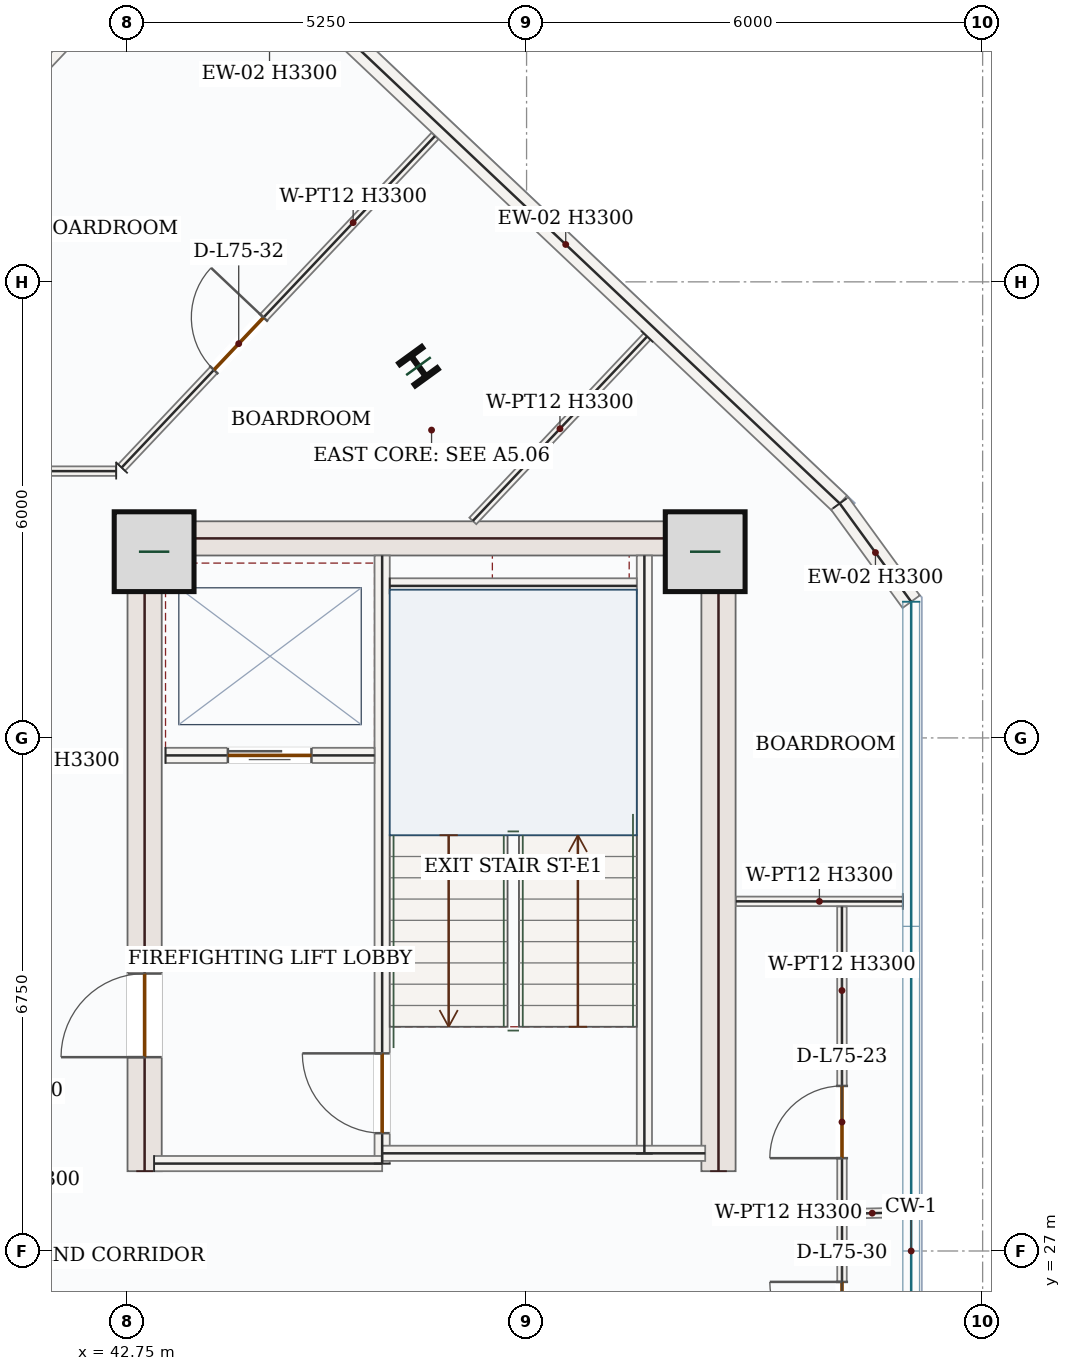
"""IFC4 building model, lengths in metres.
Left out: names, types, materials, properties, quantities, classifications, styles, units other than length and angle.
Written with IfcOpenShell. Run it as: python <this file> out.ifc"""

import sys

from ifc_helpers import new_model, si_unit, direction, frame, frame_2d, origin, origin_2d, place, context, subcontext, project, spatial, rectangle, i_section, extrude, source, transform, mapped, element, fill, save


model = new_model("IFC4")
c1 = context("Model", 3, precision=1e-05, world=origin(), true_north=direction((0.0, 1.0)))
c2 = subcontext(c1, "Body", "Model", "MODEL_VIEW")
j1 = project(units=[si_unit("LENGTHUNIT", "METRE"), si_unit("PLANEANGLEUNIT", "RADIAN")], contexts=[c1])
p1 = place(None, origin())
s1 = spatial("IfcSite", under=j1, at=p1, CompositionType="ELEMENT")
p2 = place(p1, origin())
s2 = spatial("IfcBuilding", under=s1, at=p2, CompositionType="ELEMENT")
p3 = place(p2, frame((0.0, 0.0, 310.35)))
s3 = spatial("IfcBuildingStorey", under=s2, at=p3, CompositionType="ELEMENT", Elevation=310.35)
p4 = place(p3, frame((42.975, 28.05, 0.0), z_axis=(0.0, 0.0, 1.0), x_axis=(0.0, 1.0, 0.0)))
e1 = element("IfcWall", 1, at=p4, inside=s3, PredefinedType="SHEAR", context=c2, shape_type="SweptSolid", body=[
    extrude(rectangle(XDim=8.55, YDim=0.45, at=frame_2d((4.275, 0.0))), origin(), (0.0, 0.0, 1.0), 3.3),
])
p5 = place(p4, frame((1.5, 0.0, 0.0)))
e2 = element("IfcOpeningElement", 2, at=p5, cuts=e1, PredefinedType="OPENING", context=c2, shape_type="SweptSolid", body=[
    extrude(rectangle(XDim=1.1, YDim=2.2, at=frame_2d((0.55, 1.1))), frame((0.0, 0.235, 0.0), z_axis=(0.0, -1.0, 0.0), x_axis=(1.0, 0.0, 0.0)), (0.0, 0.0, 1.0), 0.47),
])
m1 = source(origin(), c2, "Body", "SweptSolid", [
    extrude(rectangle(XDim=8.55, YDim=0.45, at=frame_2d((4.275, 0.0))), origin(), (0.0, 0.0, 1.0), 3.3),
])
p6 = place(p3, frame((50.525, 28.05, 0.0), z_axis=(0.0, 0.0, 1.0), x_axis=(0.0, 1.0, 0.0)))
e3 = element("IfcWall", 3, at=p6, inside=s3, PredefinedType="SHEAR", context=c2, shape_type="MappedRepresentation", body=[
    mapped(m1, transform((0.0, 0.0, 0.0), x_axis=(1.0, 0.0, 0.0), y_axis=(0.0, 1.0, 0.0), z_axis=(0.0, 0.0, 1.0), scale=1.0)),
])
m2 = source(origin(), c2, "Body", "SweptSolid", [
    extrude(rectangle(XDim=7.1, YDim=0.45, at=frame_2d((3.55, 0.0))), origin(), (0.0, 0.0, 1.0), 3.3),
])
p7 = place(p3, frame((43.2, 36.375, 0.0), z_axis=(0.0, 0.0, 1.0), x_axis=(1.0, 0.0, 0.0)))
e4 = element("IfcWall", 4, at=p7, inside=s3, PredefinedType="SHEAR", context=c2, shape_type="MappedRepresentation", body=[
    mapped(m2, transform((0.0, 0.0, 0.0), x_axis=(1.0, 0.0, 0.0), y_axis=(0.0, 1.0, 0.0), z_axis=(0.0, 0.0, 1.0), scale=1.0)),
])
m3 = source(origin(), c2, "Body", "SweptSolid", [
    extrude(rectangle(XDim=1.05, YDim=1.05, at=origin_2d()), origin(), (0.0, 0.0, 1.0), 3.75),
])
for number, where, z_axis, x_axis in (
    (5, (43.1, 36.2, 0.0), (0.0, 0.0, 1.0), (1.0, 0.0, 0.0)),
    (6, (50.35, 36.2, 0.0), (0.0, 0.0, 1.0), (1.0, 0.0, 0.0)),
):
    element("IfcColumn", number, at=place(p3, frame(where, z_axis=z_axis, x_axis=x_axis)), inside=s3, PredefinedType="COLUMN", context=c2, shape_type="MappedRepresentation", body=[
        mapped(m3, transform((0.0, 0.0, 0.0), x_axis=(1.0, 0.0, 0.0), y_axis=(0.0, 1.0, 0.0), z_axis=(0.0, 0.0, 1.0), scale=1.0)),
    ])
m4 = source(origin(), c2, "Body", "SweptSolid", [
    extrude(i_section(OverallWidth=0.374, OverallDepth=0.372, WebThickness=0.016, FlangeThickness=0.026, FilletRadius=0.018, at=origin_2d()), origin(), (0.0, 0.0, 1.0), 3.75),
])
p8 = place(p3, frame((46.578, 38.641, 0.0), z_axis=(0.0, 0.0, 1.0), x_axis=(0.809016994375, 0.587785252292, 0.0)))
e7 = element("IfcColumn", 7, at=p8, inside=s3, PredefinedType="COLUMN", context=c2, shape_type="MappedRepresentation", body=[
    mapped(m4, transform((0.0, 0.0, 0.0), x_axis=(1.0, 0.0, 0.0), y_axis=(0.0, 1.0, 0.0), z_axis=(0.0, 0.0, 1.0), scale=1.0)),
])
p9 = place(p3, frame((38.423, 39.26, 0.0), z_axis=(0.0, 0.0, 1.0), x_axis=(0.686888766374, 0.72676256276, 0.0)))
e8 = element("IfcWall", 8, at=p9, inside=s3, PredefinedType="SOLIDWALL", context=c2, shape_type="SweptSolid", body=[
    extrude(rectangle(XDim=5.945, YDim=0.28, at=frame_2d((2.973, 0.0))), origin(), (0.0, 0.0, 1.0), 3.3),
])
p10 = place(p9, frame((2.448, 0.0, 0.0)))
e9 = element("IfcOpeningElement", 9, at=p10, cuts=e8, PredefinedType="OPENING", context=c2, shape_type="SweptSolid", body=[
    extrude(rectangle(XDim=1.05, YDim=2.15, at=frame_2d((0.525, 1.075))), frame((0.0, 0.15, 0.0), z_axis=(0.0, -1.0, 0.0), x_axis=(1.0, 0.0, 0.0)), (0.0, 0.0, 1.0), 0.3),
])
m5 = source(origin(), c2, "Body", "SweptSolid", [
    extrude(rectangle(XDim=9.92, YDim=0.28, at=frame_2d((4.96, 0.0))), origin(), (0.0, 0.0, 1.0), 3.3),
])
p11 = place(p3, frame((44.91, 43.649, 0.0), z_axis=(0.0, 0.0, 1.0), x_axis=(0.726772856404, -0.686877875022, 0.0)))
e10 = element("IfcWall", 10, at=p11, inside=s3, PredefinedType="SOLIDWALL", context=c2, shape_type="MappedRepresentation", body=[
    mapped(m5, transform((0.0, 0.0, 0.0), x_axis=(1.0, 0.0, 0.0), y_axis=(0.0, 1.0, 0.0), z_axis=(0.0, 0.0, 1.0), scale=1.0)),
])
m6 = source(origin(), c2, "Body", "SweptSolid", [
    extrude(rectangle(XDim=1.599, YDim=0.28, at=frame_2d((0.799, 0.0))), origin(), (0.0, 0.0, 1.0), 3.3),
])
p12 = place(p3, frame((52.12, 36.835, 0.0), z_axis=(0.0, 0.0, 1.0), x_axis=(0.58820801539, -0.808709670173, 0.0)))
e11 = element("IfcWall", 11, at=p12, inside=s3, PredefinedType="SOLIDWALL", context=c2, shape_type="MappedRepresentation", body=[
    mapped(m6, transform((0.0, 0.0, 0.0), x_axis=(1.0, 0.0, 0.0), y_axis=(0.0, 1.0, 0.0), z_axis=(0.0, 0.0, 1.0), scale=1.0)),
])
m7 = source(origin(), c2, "Body", "SweptSolid", [
    extrude(rectangle(XDim=7.87, YDim=0.2, at=frame_2d((3.935, 0.0))), origin(), (0.0, 0.0, 1.0), 3.3),
])
p13 = place(p3, frame((49.55, 28.28, 0.0), z_axis=(0.0, 0.0, 1.0), x_axis=(0.0, 1.0, 0.0)))
e12 = element("IfcWall", 12, at=p13, inside=s3, PredefinedType="SOLIDWALL", context=c2, shape_type="MappedRepresentation", body=[
    mapped(m7, transform((0.0, 0.0, 0.0), x_axis=(1.0, 0.0, 0.0), y_axis=(0.0, 1.0, 0.0), z_axis=(0.0, 0.0, 1.0), scale=1.0)),
])
p14 = place(p3, frame((46.1, 28.15, 0.0), z_axis=(0.0, 0.0, 1.0), x_axis=(0.0, 1.0, 0.0)))
e13 = element("IfcWall", 13, at=p14, inside=s3, PredefinedType="SOLIDWALL", context=c2, shape_type="SweptSolid", body=[
    extrude(rectangle(XDim=8.0, YDim=0.2, at=frame_2d((4.0, 0.0))), origin(), (0.0, 0.0, 1.0), 3.3),
])
p15 = place(p14, frame((0.4, 0.0, 0.0)))
e14 = element("IfcOpeningElement", 14, at=p15, cuts=e13, PredefinedType="OPENING", context=c2, shape_type="SweptSolid", body=[
    extrude(rectangle(XDim=1.05, YDim=2.15, at=frame_2d((0.525, 1.075))), frame((0.0, 0.11, 0.0), z_axis=(0.0, -1.0, 0.0), x_axis=(1.0, 0.0, 0.0)), (0.0, 0.0, 1.0), 0.22),
])
m8 = source(origin(), c2, "Body", "SweptSolid", [
    extrude(rectangle(XDim=3.0, YDim=0.2, at=frame_2d((1.5, 0.0))), origin(), (0.0, 0.0, 1.0), 3.3),
])
p16 = place(p3, frame((43.1, 28.15, 0.0), z_axis=(0.0, 0.0, 1.0), x_axis=(1.0, 0.0, 0.0)))
e15 = element("IfcWall", 15, at=p16, inside=s3, PredefinedType="SOLIDWALL", context=c2, shape_type="MappedRepresentation", body=[
    mapped(m8, transform((0.0, 0.0, 0.0), x_axis=(1.0, 0.0, 0.0), y_axis=(0.0, 1.0, 0.0), z_axis=(0.0, 0.0, 1.0), scale=1.0)),
])
m9 = source(origin(), c2, "Body", "SweptSolid", [
    extrude(rectangle(XDim=4.25, YDim=0.2, at=frame_2d((2.125, 0.0))), origin(), (0.0, 0.0, 1.0), 3.3),
])
p17 = place(p3, frame((46.1, 28.285, 0.0), z_axis=(0.0, 0.0, 1.0), x_axis=(1.0, 0.0, 0.0)))
e16 = element("IfcWall", 16, at=p17, inside=s3, PredefinedType="SOLIDWALL", context=c2, shape_type="MappedRepresentation", body=[
    mapped(m9, transform((0.0, 0.0, 0.0), x_axis=(1.0, 0.0, 0.0), y_axis=(0.0, 1.0, 0.0), z_axis=(0.0, 0.0, 1.0), scale=1.0)),
])
m10 = source(origin(), c2, "Body", "SweptSolid", [
    extrude(rectangle(XDim=3.25, YDim=0.2, at=frame_2d((1.625, 0.0))), origin(), (0.0, 0.0, 1.0), 3.3),
])
p18 = place(p3, frame((46.2, 35.75, 0.0), z_axis=(0.0, 0.0, 1.0), x_axis=(1.0, 0.0, 0.0)))
e17 = element("IfcWall", 17, at=p18, inside=s3, PredefinedType="SOLIDWALL", context=c2, shape_type="MappedRepresentation", body=[
    mapped(m10, transform((0.0, 0.0, 0.0), x_axis=(1.0, 0.0, 0.0), y_axis=(0.0, 1.0, 0.0), z_axis=(0.0, 0.0, 1.0), scale=1.0)),
])
p19 = place(p3, frame((43.25, 33.52, 0.0), z_axis=(0.0, 0.0, 1.0), x_axis=(1.0, 0.0, 0.0)))
e18 = element("IfcWall", 18, at=p19, inside=s3, PredefinedType="SOLIDWALL", context=c2, shape_type="SweptSolid", body=[
    extrude(rectangle(XDim=2.75, YDim=0.2, at=frame_2d((1.375, 0.0))), origin(), (0.0, 0.0, 1.0), 3.3),
])
p20 = place(p19, frame((0.82, 0.0, 0.0)))
e19 = element("IfcOpeningElement", 19, at=p20, cuts=e18, PredefinedType="OPENING", context=c2, shape_type="SweptSolid", body=[
    extrude(rectangle(XDim=1.1, YDim=2.15, at=frame_2d((0.55, 1.075))), frame((0.0, 0.11, 0.0), z_axis=(0.0, -1.0, 0.0), x_axis=(1.0, 0.0, 0.0)), (0.0, 0.0, 1.0), 0.22),
])
p21 = place(p3, frame((52.149, 22.471, 0.0), z_axis=(0.0, 0.0, 1.0), x_axis=(9.7318865e-05, 0.999999995265, 0.0)))
e20 = element("IfcWall", 20, at=p21, inside=s3, PredefinedType="PARTITIONING", context=c2, shape_type="SweptSolid", body=[
    extrude(rectangle(XDim=5.017, YDim=0.125, at=frame_2d((2.509, 0.0))), origin(), (0.0, 0.0, 1.0), 3.3),
])
p22 = place(p21, frame((3.173, 0.0, 0.0)))
e21 = element("IfcOpeningElement", 21, at=p22, cuts=e20, PredefinedType="OPENING", context=c2, shape_type="SweptSolid", body=[
    extrude(rectangle(XDim=0.95, YDim=2.15, at=frame_2d((0.475, 1.075))), frame((0.0, 0.073, 0.0), z_axis=(0.0, -1.0, 0.0), x_axis=(1.0, 0.0, 0.0)), (0.0, 0.0, 1.0), 0.145),
])
m11 = source(origin(), c2, "Body", "SweptSolid", [
    extrude(rectangle(XDim=0.795, YDim=0.125, at=frame_2d((0.398, 0.0))), origin(), (0.0, 0.0, 1.0), 3.3),
])
p23 = place(p3, frame((52.15, 27.488, 0.0), z_axis=(0.0, 0.0, 1.0), x_axis=(0.999727865024, 0.023328006675, 0.0)))
e22 = element("IfcWall", 22, at=p23, inside=s3, PredefinedType="PARTITIONING", context=c2, shape_type="MappedRepresentation", body=[
    mapped(m11, transform((0.0, 0.0, 0.0), x_axis=(1.0, 0.0, 0.0), y_axis=(0.0, 1.0, 0.0), z_axis=(0.0, 0.0, 1.0), scale=1.0)),
])
m12 = source(origin(), c2, "Body", "SweptSolid", [
    extrude(rectangle(XDim=3.337, YDim=0.125, at=frame_2d((1.669, 0.0))), origin(), (0.0, 0.0, 1.0), 3.3),
])
p24 = place(p3, frame((49.585, 39.031, 0.0), z_axis=(0.0, 0.0, 1.0), x_axis=(-0.686891986515, -0.726759519278, 0.0)))
e23 = element("IfcWall", 23, at=p24, inside=s3, PredefinedType="PARTITIONING", context=c2, shape_type="MappedRepresentation", body=[
    mapped(m12, transform((0.0, 0.0, 0.0), x_axis=(1.0, 0.0, 0.0), y_axis=(0.0, 1.0, 0.0), z_axis=(0.0, 0.0, 1.0), scale=1.0)),
])
p25 = place(p3, frame((42.672, 37.306, 0.0), z_axis=(0.0, 0.0, 1.0), x_axis=(0.686871949206, 0.726778456886, 0.0)))
e24 = element("IfcWall", 24, at=p25, inside=s3, PredefinedType="PARTITIONING", context=c2, shape_type="SweptSolid", body=[
    extrude(rectangle(XDim=6.001, YDim=0.125, at=frame_2d((3.001, 0.0))), origin(), (0.0, 0.0, 1.0), 3.3),
])
p26 = place(p25, frame((1.768, 0.0, 0.0)))
e25 = element("IfcOpeningElement", 25, at=p26, cuts=e24, PredefinedType="OPENING", context=c2, shape_type="SweptSolid", body=[
    extrude(rectangle(XDim=0.95, YDim=2.15, at=frame_2d((0.475, 1.075))), frame((0.0, 0.073, 0.0), z_axis=(0.0, -1.0, 0.0), x_axis=(1.0, 0.0, 0.0)), (0.0, 0.0, 1.0), 0.145),
])
m13 = source(origin(), c2, "Body", "SweptSolid", [
    extrude(rectangle(XDim=2.195, YDim=0.125, at=frame_2d((1.098, 0.0))), origin(), (0.0, 0.0, 1.0), 3.3),
])
p27 = place(p3, frame((52.95, 31.598, 0.0), z_axis=(0.0, 0.0, 1.0), x_axis=(-0.999999696925, 0.000778556098, 0.0)))
e26 = element("IfcWall", 26, at=p27, inside=s3, PredefinedType="PARTITIONING", context=c2, shape_type="MappedRepresentation", body=[
    mapped(m13, transform((0.0, 0.0, 0.0), x_axis=(1.0, 0.0, 0.0), y_axis=(0.0, 1.0, 0.0), z_axis=(0.0, 0.0, 1.0), scale=1.0)),
])
p28 = place(p3, frame((52.15, 27.556, 0.0), z_axis=(0.0, 0.0, 1.0), x_axis=(-0.000245639885, 0.999999969831, 0.0)))
e27 = element("IfcWall", 27, at=p28, inside=s3, PredefinedType="PARTITIONING", context=c2, shape_type="SweptSolid", body=[
    extrude(rectangle(XDim=3.976, YDim=0.125, at=frame_2d((1.988, 0.0))), origin(), (0.0, 0.0, 1.0), 3.3),
])
p29 = place(p28, frame((0.666, 0.0, 0.0)))
e28 = element("IfcOpeningElement", 28, at=p29, cuts=e27, PredefinedType="OPENING", context=c2, shape_type="SweptSolid", body=[
    extrude(rectangle(XDim=0.95, YDim=2.15, at=frame_2d((0.475, 1.075))), frame((0.0, 0.073, 0.0), z_axis=(0.0, -1.0, 0.0), x_axis=(1.0, 0.0, 0.0)), (0.0, 0.0, 1.0), 0.145),
])
p30 = place(p3, frame((42.601, 37.26, 0.0), z_axis=(0.0, 0.0, 1.0), x_axis=(-1.0, 0.0, 0.0)))
e29 = element("IfcWall", 29, at=p30, inside=s3, PredefinedType="PARTITIONING", context=c2, shape_type="SweptSolid", body=[
    extrude(rectangle(XDim=6.881, YDim=0.125, at=frame_2d((3.44, 0.0))), origin(), (0.0, 0.0, 1.0), 3.3),
])
p31 = place(p30, frame((4.626, 0.0, 0.0)))
e30 = element("IfcOpeningElement", 30, at=p31, cuts=e29, PredefinedType="OPENING", context=c2, shape_type="SweptSolid", body=[
    extrude(rectangle(XDim=0.95, YDim=2.15, at=frame_2d((0.475, 1.075))), frame((0.0, 0.073, 0.0), z_axis=(0.0, -1.0, 0.0), x_axis=(1.0, 0.0, 0.0)), (0.0, 0.0, 1.0), 0.145),
])
m14 = source(origin(), c2, "Body", "SweptSolid", [
    extrude(rectangle(XDim=1.05, YDim=2.15, at=frame_2d((0.525, 1.075))), frame((0.0, 0.025, 0.0), z_axis=(0.0, -1.0, 0.0), x_axis=(1.0, 0.0, 0.0)), (0.0, 0.0, 1.0), 0.05),
])
p32 = place(p15, origin())
e31 = element("IfcDoor", 31, at=p32, inside=s3, OperationType="SINGLE_SWING_RIGHT", PredefinedType="DOOR", context=c2, shape_type="MappedRepresentation", body=[
    mapped(m14, transform((0.0, 0.0, 0.0), x_axis=(1.0, 0.0, 0.0), y_axis=(0.0, 1.0, 0.0), z_axis=(0.0, 0.0, 1.0), scale=1.0)),
])
fill(e14, e31)
m15 = source(origin(), c2, "Body", "SweptSolid", [
    extrude(rectangle(XDim=1.1, YDim=2.15, at=frame_2d((0.55, 1.075))), frame((0.0, 0.025, 0.0), z_axis=(0.0, -1.0, 0.0), x_axis=(1.0, 0.0, 0.0)), (0.0, 0.0, 1.0), 0.05),
])
p33 = place(p20, origin())
e32 = element("IfcDoor", 32, at=p33, inside=s3, OperationType="DOUBLE_DOOR_SLIDING", PredefinedType="DOOR", context=c2, shape_type="MappedRepresentation", body=[
    mapped(m15, transform((0.0, 0.0, 0.0), x_axis=(1.0, 0.0, 0.0), y_axis=(0.0, 1.0, 0.0), z_axis=(0.0, 0.0, 1.0), scale=1.0)),
])
fill(e19, e32)
m16 = source(origin(), c2, "Body", "SweptSolid", [
    extrude(rectangle(XDim=1.1, YDim=2.2, at=frame_2d((0.55, 1.1))), frame((0.0, 0.025, 0.0), z_axis=(0.0, -1.0, 0.0), x_axis=(1.0, 0.0, 0.0)), (0.0, 0.0, 1.0), 0.05),
])
p34 = place(p5, origin())
e33 = element("IfcDoor", 33, at=p34, inside=s3, OperationType="SINGLE_SWING_LEFT", PredefinedType="DOOR", context=c2, shape_type="MappedRepresentation", body=[
    mapped(m16, transform((0.0, 0.0, 0.0), x_axis=(1.0, 0.0, 0.0), y_axis=(0.0, 1.0, 0.0), z_axis=(0.0, 0.0, 1.0), scale=1.0)),
])
fill(e2, e33)
m17 = source(origin(), c2, "Body", "SweptSolid", [
    extrude(rectangle(XDim=0.95, YDim=2.15, at=frame_2d((0.475, 1.075))), frame((0.0, 0.025, 0.0), z_axis=(0.0, -1.0, 0.0), x_axis=(1.0, 0.0, 0.0)), (0.0, 0.0, 1.0), 0.05),
])
p35 = place(p29, origin())
e34 = element("IfcDoor", 34, at=p35, inside=s3, OperationType="SINGLE_SWING_LEFT", PredefinedType="DOOR", context=c2, shape_type="MappedRepresentation", body=[
    mapped(m17, transform((0.0, 0.0, 0.0), x_axis=(1.0, 0.0, 0.0), y_axis=(0.0, 1.0, 0.0), z_axis=(0.0, 0.0, 1.0), scale=1.0)),
])
fill(e28, e34)
p36 = place(p22, origin())
e35 = element("IfcDoor", 35, at=p36, inside=s3, OperationType="SINGLE_SWING_RIGHT", PredefinedType="DOOR", context=c2, shape_type="MappedRepresentation", body=[
    mapped(m17, transform((0.0, 0.0, 0.0), x_axis=(1.0, 0.0, 0.0), y_axis=(0.0, 1.0, 0.0), z_axis=(0.0, 0.0, 1.0), scale=1.0)),
])
fill(e21, e35)
p37 = place(p26, origin())
e36 = element("IfcDoor", 36, at=p37, inside=s3, OperationType="SINGLE_SWING_RIGHT", PredefinedType="DOOR", context=c2, shape_type="MappedRepresentation", body=[
    mapped(m17, transform((0.0, 0.0, 0.0), x_axis=(1.0, 0.0, 0.0), y_axis=(0.0, 1.0, 0.0), z_axis=(0.0, 0.0, 1.0), scale=1.0)),
])
fill(e25, e36)
save(model, sys.argv[1])
